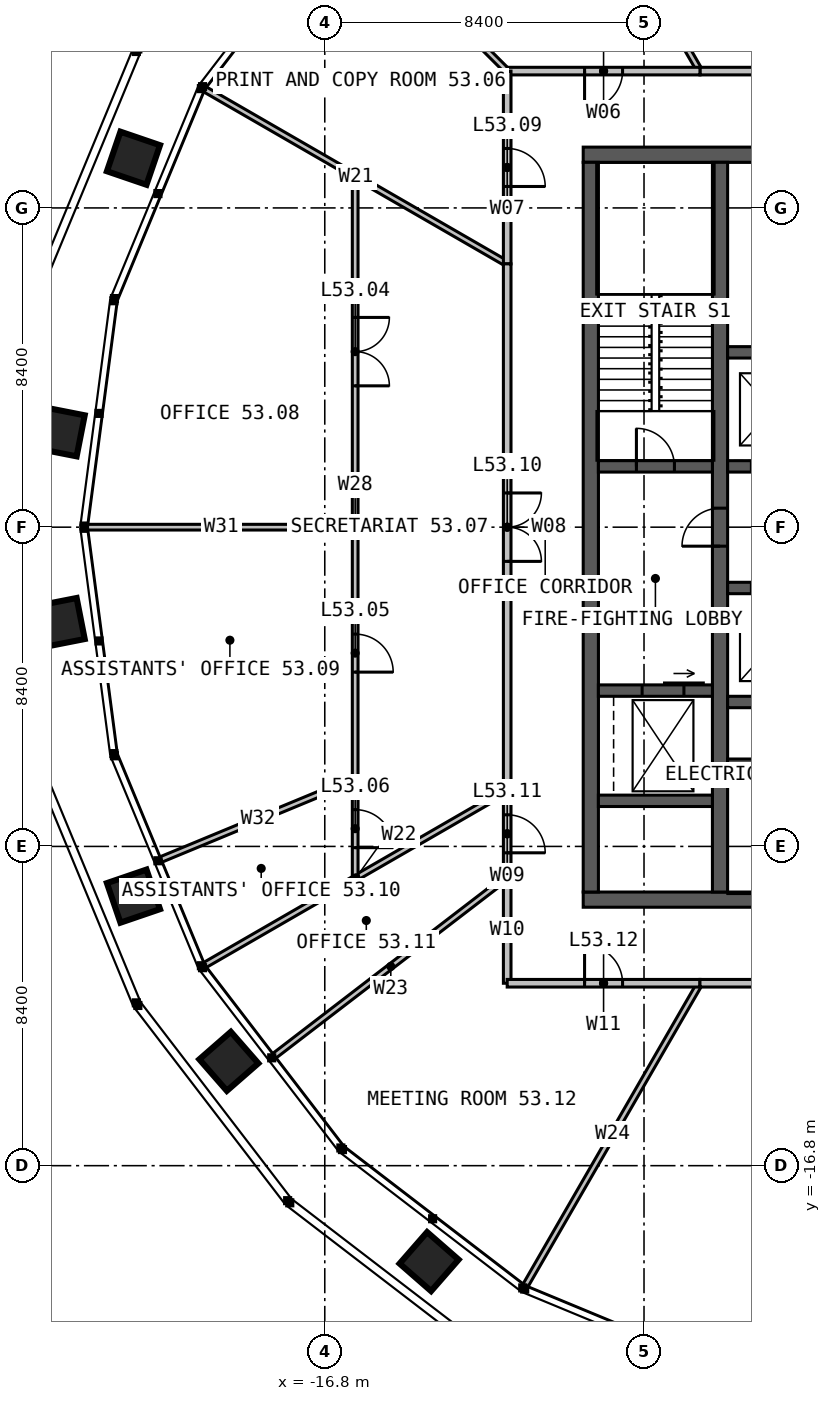
"""IFC4 building model, lengths in metres.
Left out: names, types, materials, properties, quantities, classifications, styles, units other than length and angle.
Written with IfcOpenShell. Run it as: python <this file> out.ifc"""

import sys

from ifc_helpers import new_model, si_unit, direction, frame, frame_2d, origin, place, context, subcontext, project, spatial, rectangle, extrude, element, fill, save


model = new_model("IFC4")
c1 = context("Model", 3, precision=1e-05, world=origin(), true_north=direction((0.0, 1.0)))
c2 = subcontext(c1, "Body", "Model", "MODEL_VIEW")
j1 = project(units=[si_unit("LENGTHUNIT", "METRE"), si_unit("PLANEANGLEUNIT", "RADIAN")], contexts=[c1])
p1 = place(None, origin())
s1 = spatial("IfcSite", under=j1, at=p1, CompositionType="ELEMENT")
p2 = place(p1, origin())
s2 = spatial("IfcBuilding", under=s1, at=p2, CompositionType="ELEMENT")
p3 = place(p2, frame((0.0, 0.0, 220.0)))
s3 = spatial("IfcBuildingStorey", under=s2, at=p3, CompositionType="ELEMENT", Elevation=220.0)
p4 = place(p3, frame((-10.0, 9.8, 0.0), z_axis=(0.0, 0.0, 1.0), x_axis=(1.0, 0.0, 0.0)))
e1 = element("IfcWall", 1, at=p4, inside=s3, PredefinedType="SOLIDWALL", context=c2, shape_type="SweptSolid", body=[
    extrude(rectangle(XDim=20.0, YDim=0.4, at=frame_2d((10.0, 0.0))), origin(), (0.0, 0.0, 1.0), 4.0),
])
p5 = place(p4, frame((9.4, 0.0, 0.0)))
e2 = element("IfcOpeningElement", 2, at=p5, cuts=e1, PredefinedType="OPENING", context=c2, shape_type="SweptSolid", body=[
    extrude(rectangle(XDim=1.2, YDim=2.2, at=frame_2d((0.6, 1.1))), frame((0.0, 0.21, 0.0), z_axis=(0.0, -1.0, 0.0), x_axis=(1.0, 0.0, 0.0)), (0.0, 0.0, 1.0), 0.42),
])
p6 = place(p3, frame((10.0, -9.8, 0.0), z_axis=(0.0, 0.0, 1.0), x_axis=(-1.0, 0.0, 0.0)))
e3 = element("IfcWall", 3, at=p6, inside=s3, PredefinedType="SOLIDWALL", context=c2, shape_type="SweptSolid", body=[
    extrude(rectangle(XDim=20.0, YDim=0.4, at=frame_2d((10.0, 0.0))), origin(), (0.0, 0.0, 1.0), 4.0),
])
p7 = place(p6, frame((6.875, 0.0, 0.0)))
e4 = element("IfcOpeningElement", 4, at=p7, cuts=e3, PredefinedType="OPENING", context=c2, shape_type="SweptSolid", body=[
    extrude(rectangle(XDim=1.2, YDim=2.2, at=frame_2d((0.6, 1.1))), frame((0.0, 0.21, 0.0), z_axis=(0.0, -1.0, 0.0), x_axis=(1.0, 0.0, 0.0)), (0.0, 0.0, 1.0), 0.42),
])
p8 = place(p3, frame((-9.8, 9.6, 0.0), z_axis=(0.0, 0.0, 1.0), x_axis=(0.0, -1.0, 0.0)))
e5 = element("IfcWall", 5, at=p8, inside=s3, PredefinedType="SOLIDWALL", context=c2, shape_type="SweptSolid", body=[
    extrude(rectangle(XDim=19.2, YDim=0.4, at=frame_2d((9.6, 0.0))), origin(), (0.0, 0.0, 1.0), 4.0),
])
p9 = place(p3, frame((-6.4, -9.6, 0.0), z_axis=(0.0, 0.0, 1.0), x_axis=(0.0, 1.0, 0.0)))
e6 = element("IfcWall", 6, at=p9, inside=s3, PredefinedType="SOLIDWALL", context=c2, shape_type="SweptSolid", body=[
    extrude(rectangle(XDim=19.2, YDim=0.4, at=frame_2d((9.6, 0.0))), origin(), (0.0, 0.0, 1.0), 4.0),
])
p10 = place(p9, frame((9.1, 0.0, 0.0)))
e7 = element("IfcOpeningElement", 7, at=p10, cuts=e6, PredefinedType="OPENING", context=c2, shape_type="SweptSolid", body=[
    extrude(rectangle(XDim=1.0, YDim=2.2, at=frame_2d((0.5, 1.1))), frame((0.0, 0.21, 0.0), z_axis=(0.0, -1.0, 0.0), x_axis=(1.0, 0.0, 0.0)), (0.0, 0.0, 1.0), 0.42),
])
p11 = place(p3, frame((-6.2, 1.6, 0.0), z_axis=(0.0, 0.0, 1.0), x_axis=(1.0, 0.0, 0.0)))
e8 = element("IfcWall", 8, at=p11, inside=s3, PredefinedType="SOLIDWALL", context=c2, shape_type="SweptSolid", body=[
    extrude(rectangle(XDim=4.85, YDim=0.3, at=frame_2d((2.425, 0.0))), origin(), (0.0, 0.0, 1.0), 4.0),
])
p12 = place(p11, frame((0.625, 0.0, 0.0)))
e9 = element("IfcOpeningElement", 9, at=p12, cuts=e8, PredefinedType="OPENING", context=c2, shape_type="SweptSolid", body=[
    extrude(rectangle(XDim=1.1, YDim=2.2, at=frame_2d((0.55, 1.1))), frame((0.0, 0.16, 0.0), z_axis=(0.0, -1.0, 0.0), x_axis=(1.0, 0.0, 0.0)), (0.0, 0.0, 1.0), 0.32),
])
p13 = place(p11, frame((3.15, 0.0, 0.0)))
e10 = element("IfcOpeningElement", 10, at=p13, cuts=e8, PredefinedType="OPENING", context=c2, shape_type="SweptSolid", body=[
    extrude(rectangle(XDim=1.1, YDim=2.2, at=frame_2d((0.55, 1.1))), frame((0.0, 0.16, 0.0), z_axis=(0.0, -1.0, 0.0), x_axis=(1.0, 0.0, 0.0)), (0.0, 0.0, 1.0), 0.32),
])
p14 = place(p3, frame((-6.2, 4.6, 0.0), z_axis=(0.0, 0.0, 1.0), x_axis=(1.0, 0.0, 0.0)))
e11 = element("IfcWall", 11, at=p14, inside=s3, PredefinedType="SOLIDWALL", context=c2, shape_type="SweptSolid", body=[
    extrude(rectangle(XDim=4.85, YDim=0.3, at=frame_2d((2.425, 0.0))), origin(), (0.0, 0.0, 1.0), 4.0),
])
p15 = place(p3, frame((-6.2, -1.6, 0.0), z_axis=(0.0, 0.0, 1.0), x_axis=(1.0, 0.0, 0.0)))
e12 = element("IfcWall", 12, at=p15, inside=s3, PredefinedType="SOLIDWALL", context=c2, shape_type="SweptSolid", body=[
    extrude(rectangle(XDim=7.4, YDim=0.3, at=frame_2d((3.7, 0.0))), origin(), (0.0, 0.0, 1.0), 4.0),
])
p16 = place(p15, frame((0.625, 0.0, 0.0)))
e13 = element("IfcOpeningElement", 13, at=p16, cuts=e12, PredefinedType="OPENING", context=c2, shape_type="SweptSolid", body=[
    extrude(rectangle(XDim=1.1, YDim=2.2, at=frame_2d((0.55, 1.1))), frame((0.0, 0.16, 0.0), z_axis=(0.0, -1.0, 0.0), x_axis=(1.0, 0.0, 0.0)), (0.0, 0.0, 1.0), 0.32),
])
p17 = place(p15, frame((3.15, 0.0, 0.0)))
e14 = element("IfcOpeningElement", 14, at=p17, cuts=e12, PredefinedType="OPENING", context=c2, shape_type="SweptSolid", body=[
    extrude(rectangle(XDim=1.1, YDim=2.2, at=frame_2d((0.55, 1.1))), frame((0.0, 0.16, 0.0), z_axis=(0.0, -1.0, 0.0), x_axis=(1.0, 0.0, 0.0)), (0.0, 0.0, 1.0), 0.32),
])
p18 = place(p15, frame((5.675, 0.0, 0.0)))
e15 = element("IfcOpeningElement", 15, at=p18, cuts=e12, PredefinedType="OPENING", context=c2, shape_type="SweptSolid", body=[
    extrude(rectangle(XDim=1.1, YDim=2.2, at=frame_2d((0.55, 1.1))), frame((0.0, 0.16, 0.0), z_axis=(0.0, -1.0, 0.0), x_axis=(1.0, 0.0, 0.0)), (0.0, 0.0, 1.0), 0.32),
])
p19 = place(p3, frame((-6.2, -4.6, 0.0), z_axis=(0.0, 0.0, 1.0), x_axis=(1.0, 0.0, 0.0)))
e16 = element("IfcWall", 16, at=p19, inside=s3, PredefinedType="SOLIDWALL", context=c2, shape_type="SweptSolid", body=[
    extrude(rectangle(XDim=7.4, YDim=0.3, at=frame_2d((3.7, 0.0))), origin(), (0.0, 0.0, 1.0), 4.0),
])
p20 = place(p3, frame((-6.2, -6.2, 0.0), z_axis=(0.0, 0.0, 1.0), x_axis=(1.0, 0.0, 0.0)))
e17 = element("IfcWall", 17, at=p20, inside=s3, PredefinedType="SOLIDWALL", context=c2, shape_type="SweptSolid", body=[
    extrude(rectangle(XDim=7.4, YDim=0.2, at=frame_2d((3.7, 0.0))), origin(), (0.0, 0.0, 1.0), 4.0),
])
p21 = place(p3, frame((-9.6, 1.6, 0.0), z_axis=(0.0, 0.0, 1.0), x_axis=(1.0, 0.0, 0.0)))
e18 = element("IfcWall", 18, at=p21, inside=s3, PredefinedType="SOLIDWALL", context=c2, shape_type="SweptSolid", body=[
    extrude(rectangle(XDim=3.0, YDim=0.3, at=frame_2d((1.5, 0.0))), origin(), (0.0, 0.0, 1.0), 4.0),
])
p22 = place(p21, frame((1.0, 0.0, 0.0)))
e19 = element("IfcOpeningElement", 19, at=p22, cuts=e18, PredefinedType="OPENING", context=c2, shape_type="SweptSolid", body=[
    extrude(rectangle(XDim=1.0, YDim=2.2, at=frame_2d((0.5, 1.1))), frame((0.0, 0.16, 0.0), z_axis=(0.0, -1.0, 0.0), x_axis=(1.0, 0.0, 0.0)), (0.0, 0.0, 1.0), 0.32),
])
p23 = place(p3, frame((-9.6, -4.3, 0.0), z_axis=(0.0, 0.0, 1.0), x_axis=(1.0, 0.0, 0.0)))
e20 = element("IfcWall", 20, at=p23, inside=s3, PredefinedType="SOLIDWALL", context=c2, shape_type="SweptSolid", body=[
    extrude(rectangle(XDim=3.0, YDim=0.3, at=frame_2d((1.5, 0.0))), origin(), (0.0, 0.0, 1.0), 4.0),
])
p24 = place(p23, frame((1.15, 0.0, 0.0)))
e21 = element("IfcOpeningElement", 21, at=p24, cuts=e20, PredefinedType="OPENING", context=c2, shape_type="SweptSolid", body=[
    extrude(rectangle(XDim=1.1, YDim=2.2, at=frame_2d((0.55, 1.1))), frame((0.0, 0.16, 0.0), z_axis=(0.0, -1.0, 0.0), x_axis=(1.0, 0.0, 0.0)), (0.0, 0.0, 1.0), 0.32),
])
p25 = place(p3, frame((-9.6, -7.2, 0.0), z_axis=(0.0, 0.0, 1.0), x_axis=(1.0, 0.0, 0.0)))
e22 = element("IfcWall", 22, at=p25, inside=s3, PredefinedType="SOLIDWALL", context=c2, shape_type="SweptSolid", body=[
    extrude(rectangle(XDim=3.0, YDim=0.3, at=frame_2d((1.5, 0.0))), origin(), (0.0, 0.0, 1.0), 4.0),
])
p26 = place(p3, frame((-6.928, 12.0, 0.0), z_axis=(0.0, 0.0, 1.0), x_axis=(-0.500006167237, 0.866021843099, 0.0)))
e23 = element("IfcWall", 23, at=p26, inside=s3, PredefinedType="PARTITIONING", context=c2, shape_type="SweptSolid", body=[
    extrude(rectangle(XDim=9.187, YDim=0.15, at=frame_2d((4.594, 0.0))), origin(), (0.0, 0.0, 1.0), 2.89),
])
p27 = place(p3, frame((-12.0, 12.0, 0.0), z_axis=(0.0, 0.0, 1.0), x_axis=(-0.707106781187, 0.707106781187, 0.0)))
e24 = element("IfcWall", 24, at=p27, inside=s3, PredefinedType="PARTITIONING", context=c2, shape_type="SweptSolid", body=[
    extrude(rectangle(XDim=6.073, YDim=0.15, at=frame_2d((3.036, 0.0))), origin(), (0.0, 0.0, 1.0), 2.89),
])
for number, where, z_axis, x_axis in (
    (25, (-12.0, 6.928, 0.0), (0.0, 0.0, 1.0), (-0.866, 0.5, 0.0)),
    (26, (-12.0, -6.928, 0.0), (0.0, 0.0, 1.0), (-0.866, -0.5, 0.0)),
):
    element("IfcWall", number, at=place(p3, frame(where, z_axis=z_axis, x_axis=x_axis)), inside=s3, PredefinedType="PARTITIONING", context=c2, shape_type="SweptSolid", body=[
        extrude(rectangle(XDim=9.187, YDim=0.15, at=frame_2d((4.594, 0.0))), origin(), (0.0, 0.0, 1.0), 2.89),
    ])
p28 = place(p3, frame((-12.0, -9.208, 0.0), z_axis=(0.0, 0.0, 1.0), x_axis=(-0.793364023141, -0.608747506595, 0.0)))
e27 = element("IfcWall", 27, at=p28, inside=s3, PredefinedType="PARTITIONING", context=c2, shape_type="SweptSolid", body=[
    extrude(rectangle(XDim=7.72, YDim=0.15, at=frame_2d((3.86, 0.0))), origin(), (0.0, 0.0, 1.0), 2.79),
])
p29 = place(p3, frame((-6.928, -12.0, 0.0), z_axis=(0.0, 0.0, 1.0), x_axis=(-0.500006167237, -0.866021843099, 0.0)))
e28 = element("IfcWall", 28, at=p29, inside=s3, PredefinedType="PARTITIONING", context=c2, shape_type="SweptSolid", body=[
    extrude(rectangle(XDim=9.187, YDim=0.15, at=frame_2d((4.594, 0.0))), origin(), (0.0, 0.0, 1.0), 2.89),
])
p30 = place(p3, frame((6.928, 12.0, 0.0), z_axis=(0.0, 0.0, 1.0), x_axis=(-1.0, 0.0, 0.0)))
e29 = element("IfcWall", 29, at=p30, inside=s3, PredefinedType="PARTITIONING", context=c2, shape_type="SweptSolid", body=[
    extrude(rectangle(XDim=13.856, YDim=0.2, at=frame_2d((6.928, 0.0))), origin(), (0.0, 0.0, 1.0), 3.8),
])
p31 = place(p30, frame((6.028, 0.0, 0.0)))
e30 = element("IfcOpeningElement", 30, at=p31, cuts=e29, PredefinedType="OPENING", context=c2, shape_type="SweptSolid", body=[
    extrude(rectangle(XDim=1.8, YDim=2.2, at=frame_2d((0.9, 1.1))), frame((0.0, 0.11, 0.0), z_axis=(0.0, -1.0, 0.0), x_axis=(1.0, 0.0, 0.0)), (0.0, 0.0, 1.0), 0.22),
])
p32 = place(p3, frame((-6.928, 12.0, 0.0), z_axis=(0.0, 0.0, 1.0), x_axis=(-1.0, 0.0, 0.0)))
e31 = element("IfcWall", 31, at=p32, inside=s3, PredefinedType="PARTITIONING", context=c2, shape_type="SweptSolid", body=[
    extrude(rectangle(XDim=5.072, YDim=0.2, at=frame_2d((2.536, 0.0))), origin(), (0.0, 0.0, 1.0), 3.8),
])
p33 = place(p32, frame((2.036, 0.0, 0.0)))
e32 = element("IfcOpeningElement", 32, at=p33, cuts=e31, PredefinedType="OPENING", context=c2, shape_type="SweptSolid", body=[
    extrude(rectangle(XDim=1.0, YDim=2.2, at=frame_2d((0.5, 1.1))), frame((0.0, 0.11, 0.0), z_axis=(0.0, -1.0, 0.0), x_axis=(1.0, 0.0, 0.0)), (0.0, 0.0, 1.0), 0.22),
])
p34 = place(p3, frame((-12.0, 12.0, 0.0), z_axis=(0.0, 0.0, 1.0), x_axis=(0.0, -1.0, 0.0)))
e33 = element("IfcWall", 33, at=p34, inside=s3, PredefinedType="PARTITIONING", context=c2, shape_type="SweptSolid", body=[
    extrude(rectangle(XDim=5.072, YDim=0.2, at=frame_2d((2.536, 0.0))), origin(), (0.0, 0.0, 1.0), 3.8),
])
p35 = place(p34, frame((2.036, 0.0, 0.0)))
e34 = element("IfcOpeningElement", 34, at=p35, cuts=e33, PredefinedType="OPENING", context=c2, shape_type="SweptSolid", body=[
    extrude(rectangle(XDim=1.0, YDim=2.2, at=frame_2d((0.5, 1.1))), frame((0.0, 0.11, 0.0), z_axis=(0.0, -1.0, 0.0), x_axis=(1.0, 0.0, 0.0)), (0.0, 0.0, 1.0), 0.22),
])
p36 = place(p3, frame((-16.0, 9.238, 0.0), z_axis=(0.0, 0.0, 1.0), x_axis=(0.0, -1.0, 0.0)))
e35 = element("IfcWall", 35, at=p36, inside=s3, PredefinedType="PARTITIONING", context=c2, shape_type="SweptSolid", body=[
    extrude(rectangle(XDim=18.475, YDim=0.15, at=frame_2d((9.238, 0.0))), origin(), (0.0, 0.0, 1.0), 2.89),
])
p37 = place(p36, frame((3.719, 0.0, 0.0)))
e36 = element("IfcOpeningElement", 36, at=p37, cuts=e35, PredefinedType="OPENING", context=c2, shape_type="SweptSolid", body=[
    extrude(rectangle(XDim=1.8, YDim=2.2, at=frame_2d((0.9, 1.1))), frame((0.0, 0.085, 0.0), z_axis=(0.0, -1.0, 0.0), x_axis=(1.0, 0.0, 0.0)), (0.0, 0.0, 1.0), 0.17),
])
p38 = place(p36, frame((12.051, 0.0, 0.0)))
e37 = element("IfcOpeningElement", 37, at=p38, cuts=e35, PredefinedType="OPENING", context=c2, shape_type="SweptSolid", body=[
    extrude(rectangle(XDim=1.0, YDim=2.2, at=frame_2d((0.5, 1.1))), frame((0.0, 0.085, 0.0), z_axis=(0.0, -1.0, 0.0), x_axis=(1.0, 0.0, 0.0)), (0.0, 0.0, 1.0), 0.17),
])
p39 = place(p36, frame((16.67, 0.0, 0.0)))
e38 = element("IfcOpeningElement", 38, at=p39, cuts=e35, PredefinedType="OPENING", context=c2, shape_type="SweptSolid", body=[
    extrude(rectangle(XDim=1.0, YDim=2.2, at=frame_2d((0.5, 1.1))), frame((0.0, 0.085, 0.0), z_axis=(0.0, -1.0, 0.0), x_axis=(1.0, 0.0, 0.0)), (0.0, 0.0, 1.0), 0.17),
])
p40 = place(p3, frame((-16.0, 0.0, 0.0), z_axis=(0.0, 0.0, 1.0), x_axis=(-1.0, 0.0, 0.0)))
e39 = element("IfcWall", 39, at=p40, inside=s3, PredefinedType="PARTITIONING", context=c2, shape_type="SweptSolid", body=[
    extrude(rectangle(XDim=7.043, YDim=0.15, at=frame_2d((3.521, 0.0))), origin(), (0.0, 0.0, 1.0), 2.89),
])
p41 = place(p3, frame((-16.0, -6.627, 0.0), z_axis=(0.0, 0.0, 1.0), x_axis=(-0.923872026087, -0.382701553975, 0.0)))
e40 = element("IfcWall", 40, at=p41, inside=s3, PredefinedType="PARTITIONING", context=c2, shape_type="SweptSolid", body=[
    extrude(rectangle(XDim=5.528, YDim=0.15, at=frame_2d((2.764, 0.0))), origin(), (0.0, 0.0, 1.0), 2.79),
])
p42 = place(p3, frame((-12.0, 6.928, 0.0), z_axis=(0.0, 0.0, 1.0), x_axis=(0.0, -1.0, 0.0)))
e41 = element("IfcWall", 41, at=p42, inside=s3, PredefinedType="PARTITIONING", context=c2, shape_type="SweptSolid", body=[
    extrude(rectangle(XDim=13.856, YDim=0.2, at=frame_2d((6.928, 0.0))), origin(), (0.0, 0.0, 1.0), 3.8),
])
p43 = place(p42, frame((6.028, 0.0, 0.0)))
e42 = element("IfcOpeningElement", 42, at=p43, cuts=e41, PredefinedType="OPENING", context=c2, shape_type="SweptSolid", body=[
    extrude(rectangle(XDim=1.8, YDim=2.2, at=frame_2d((0.9, 1.1))), frame((0.0, 0.11, 0.0), z_axis=(0.0, -1.0, 0.0), x_axis=(1.0, 0.0, 0.0)), (0.0, 0.0, 1.0), 0.22),
])
p44 = place(p3, frame((-12.0, -6.928, 0.0), z_axis=(0.0, 0.0, 1.0), x_axis=(0.0, -1.0, 0.0)))
e43 = element("IfcWall", 43, at=p44, inside=s3, PredefinedType="PARTITIONING", context=c2, shape_type="SweptSolid", body=[
    extrude(rectangle(XDim=2.28, YDim=0.2, at=frame_2d((1.14, 0.0))), origin(), (0.0, 0.0, 1.0), 3.8),
])
p45 = place(p44, frame((0.64, 0.0, 0.0)))
e44 = element("IfcOpeningElement", 44, at=p45, cuts=e43, PredefinedType="OPENING", context=c2, shape_type="SweptSolid", body=[
    extrude(rectangle(XDim=1.0, YDim=2.2, at=frame_2d((0.5, 1.1))), frame((0.0, 0.11, 0.0), z_axis=(0.0, -1.0, 0.0), x_axis=(1.0, 0.0, 0.0)), (0.0, 0.0, 1.0), 0.22),
])
p46 = place(p3, frame((-12.0, -9.208, 0.0), z_axis=(0.0, 0.0, 1.0), x_axis=(0.0, -1.0, 0.0)))
e45 = element("IfcWall", 45, at=p46, inside=s3, PredefinedType="PARTITIONING", context=c2, shape_type="SweptSolid", body=[
    extrude(rectangle(XDim=2.792, YDim=0.2, at=frame_2d((1.396, 0.0))), origin(), (0.0, 0.0, 1.0), 3.8),
])
p47 = place(p3, frame((-12.0, -12.0, 0.0), z_axis=(0.0, 0.0, 1.0), x_axis=(1.0, 0.0, 0.0)))
e46 = element("IfcWall", 46, at=p47, inside=s3, PredefinedType="PARTITIONING", context=c2, shape_type="SweptSolid", body=[
    extrude(rectangle(XDim=5.072, YDim=0.2, at=frame_2d((2.536, 0.0))), origin(), (0.0, 0.0, 1.0), 3.8),
])
p48 = place(p47, frame((2.036, 0.0, 0.0)))
e47 = element("IfcOpeningElement", 47, at=p48, cuts=e46, PredefinedType="OPENING", context=c2, shape_type="SweptSolid", body=[
    extrude(rectangle(XDim=1.0, YDim=2.2, at=frame_2d((0.5, 1.1))), frame((0.0, 0.11, 0.0), z_axis=(0.0, -1.0, 0.0), x_axis=(1.0, 0.0, 0.0)), (0.0, 0.0, 1.0), 0.22),
])
p49 = place(p3, frame((-6.928, -12.0, 0.0), z_axis=(0.0, 0.0, 1.0), x_axis=(1.0, 0.0, 0.0)))
e48 = element("IfcWall", 48, at=p49, inside=s3, PredefinedType="PARTITIONING", context=c2, shape_type="SweptSolid", body=[
    extrude(rectangle(XDim=10.144, YDim=0.2, at=frame_2d((5.072, 0.0))), origin(), (0.0, 0.0, 1.0), 3.8),
])
p50 = place(p49, frame((4.172, 0.0, 0.0)))
e49 = element("IfcOpeningElement", 49, at=p50, cuts=e48, PredefinedType="OPENING", context=c2, shape_type="SweptSolid", body=[
    extrude(rectangle(XDim=1.8, YDim=2.2, at=frame_2d((0.9, 1.1))), frame((0.0, 0.11, 0.0), z_axis=(0.0, -1.0, 0.0), x_axis=(1.0, 0.0, 0.0)), (0.0, 0.0, 1.0), 0.22),
])
p51 = place(p10, origin())
e50 = element("IfcDoor", 50, at=p51, inside=s3, OperationType="SINGLE_SWING_LEFT", PredefinedType="DOOR", context=c2, shape_type="SweptSolid", body=[
    extrude(rectangle(XDim=1.0, YDim=2.2, at=frame_2d((0.5, 1.1))), frame((0.0, 0.025, 0.0), z_axis=(0.0, -1.0, 0.0), x_axis=(1.0, 0.0, 0.0)), (0.0, 0.0, 1.0), 0.05),
])
fill(e7, e50)
p52 = place(p22, origin())
e51 = element("IfcDoor", 51, at=p52, inside=s3, OperationType="SINGLE_SWING_LEFT", PredefinedType="DOOR", context=c2, shape_type="SweptSolid", body=[
    extrude(rectangle(XDim=1.0, YDim=2.2, at=frame_2d((0.5, 1.1))), frame((0.0, 0.025, 0.0), z_axis=(0.0, -1.0, 0.0), x_axis=(1.0, 0.0, 0.0)), (0.0, 0.0, 1.0), 0.05),
])
fill(e19, e51)
p53 = place(p24, origin())
e52 = element("IfcDoor", 52, at=p53, inside=s3, OperationType="SLIDING_TO_LEFT", PredefinedType="DOOR", context=c2, shape_type="SweptSolid", body=[
    extrude(rectangle(XDim=1.1, YDim=2.2, at=frame_2d((0.55, 1.1))), frame((0.0, 0.025, 0.0), z_axis=(0.0, -1.0, 0.0), x_axis=(1.0, 0.0, 0.0)), (0.0, 0.0, 1.0), 0.05),
])
fill(e21, e52)
p54 = place(p33, origin())
e53 = element("IfcDoor", 53, at=p54, inside=s3, OperationType="SINGLE_SWING_RIGHT", PredefinedType="DOOR", context=c2, shape_type="SweptSolid", body=[
    extrude(rectangle(XDim=1.0, YDim=2.2, at=frame_2d((0.5, 1.1))), frame((0.0, 0.025, 0.0), z_axis=(0.0, -1.0, 0.0), x_axis=(1.0, 0.0, 0.0)), (0.0, 0.0, 1.0), 0.05),
])
fill(e32, e53)
p55 = place(p35, origin())
e54 = element("IfcDoor", 54, at=p55, inside=s3, OperationType="SINGLE_SWING_RIGHT", PredefinedType="DOOR", context=c2, shape_type="SweptSolid", body=[
    extrude(rectangle(XDim=1.0, YDim=2.2, at=frame_2d((0.5, 1.1))), frame((0.0, 0.025, 0.0), z_axis=(0.0, -1.0, 0.0), x_axis=(1.0, 0.0, 0.0)), (0.0, 0.0, 1.0), 0.05),
])
fill(e34, e54)
p56 = place(p37, origin())
e55 = element("IfcDoor", 55, at=p56, inside=s3, OperationType="DOUBLE_DOOR_SINGLE_SWING", PredefinedType="DOOR", context=c2, shape_type="SweptSolid", body=[
    extrude(rectangle(XDim=1.8, YDim=2.2, at=frame_2d((0.9, 1.1))), frame((0.0, 0.025, 0.0), z_axis=(0.0, -1.0, 0.0), x_axis=(1.0, 0.0, 0.0)), (0.0, 0.0, 1.0), 0.05),
])
fill(e36, e55)
p57 = place(p38, origin())
e56 = element("IfcDoor", 56, at=p57, inside=s3, OperationType="SINGLE_SWING_RIGHT", PredefinedType="DOOR", context=c2, shape_type="SweptSolid", body=[
    extrude(rectangle(XDim=1.0, YDim=2.2, at=frame_2d((0.5, 1.1))), frame((0.0, 0.025, 0.0), z_axis=(0.0, -1.0, 0.0), x_axis=(1.0, 0.0, 0.0)), (0.0, 0.0, 1.0), 0.05),
])
fill(e37, e56)
p58 = place(p39, origin())
e57 = element("IfcDoor", 57, at=p58, inside=s3, OperationType="SINGLE_SWING_RIGHT", PredefinedType="DOOR", context=c2, shape_type="SweptSolid", body=[
    extrude(rectangle(XDim=1.0, YDim=2.2, at=frame_2d((0.5, 1.1))), frame((0.0, 0.025, 0.0), z_axis=(0.0, -1.0, 0.0), x_axis=(1.0, 0.0, 0.0)), (0.0, 0.0, 1.0), 0.05),
])
fill(e38, e57)
p59 = place(p43, origin())
e58 = element("IfcDoor", 58, at=p59, inside=s3, OperationType="DOUBLE_DOOR_SINGLE_SWING", PredefinedType="DOOR", context=c2, shape_type="SweptSolid", body=[
    extrude(rectangle(XDim=1.8, YDim=2.2, at=frame_2d((0.9, 1.1))), frame((0.0, 0.025, 0.0), z_axis=(0.0, -1.0, 0.0), x_axis=(1.0, 0.0, 0.0)), (0.0, 0.0, 1.0), 0.05),
])
fill(e42, e58)
p60 = place(p45, origin())
e59 = element("IfcDoor", 59, at=p60, inside=s3, OperationType="SINGLE_SWING_RIGHT", PredefinedType="DOOR", context=c2, shape_type="SweptSolid", body=[
    extrude(rectangle(XDim=1.0, YDim=2.2, at=frame_2d((0.5, 1.1))), frame((0.0, 0.025, 0.0), z_axis=(0.0, -1.0, 0.0), x_axis=(1.0, 0.0, 0.0)), (0.0, 0.0, 1.0), 0.05),
])
fill(e44, e59)
p61 = place(p48, origin())
e60 = element("IfcDoor", 60, at=p61, inside=s3, OperationType="SINGLE_SWING_LEFT", PredefinedType="DOOR", context=c2, shape_type="SweptSolid", body=[
    extrude(rectangle(XDim=1.0, YDim=2.2, at=frame_2d((0.5, 1.1))), frame((0.0, 0.025, 0.0), z_axis=(0.0, -1.0, 0.0), x_axis=(1.0, 0.0, 0.0)), (0.0, 0.0, 1.0), 0.05),
])
fill(e47, e60)
save(model, sys.argv[1])
